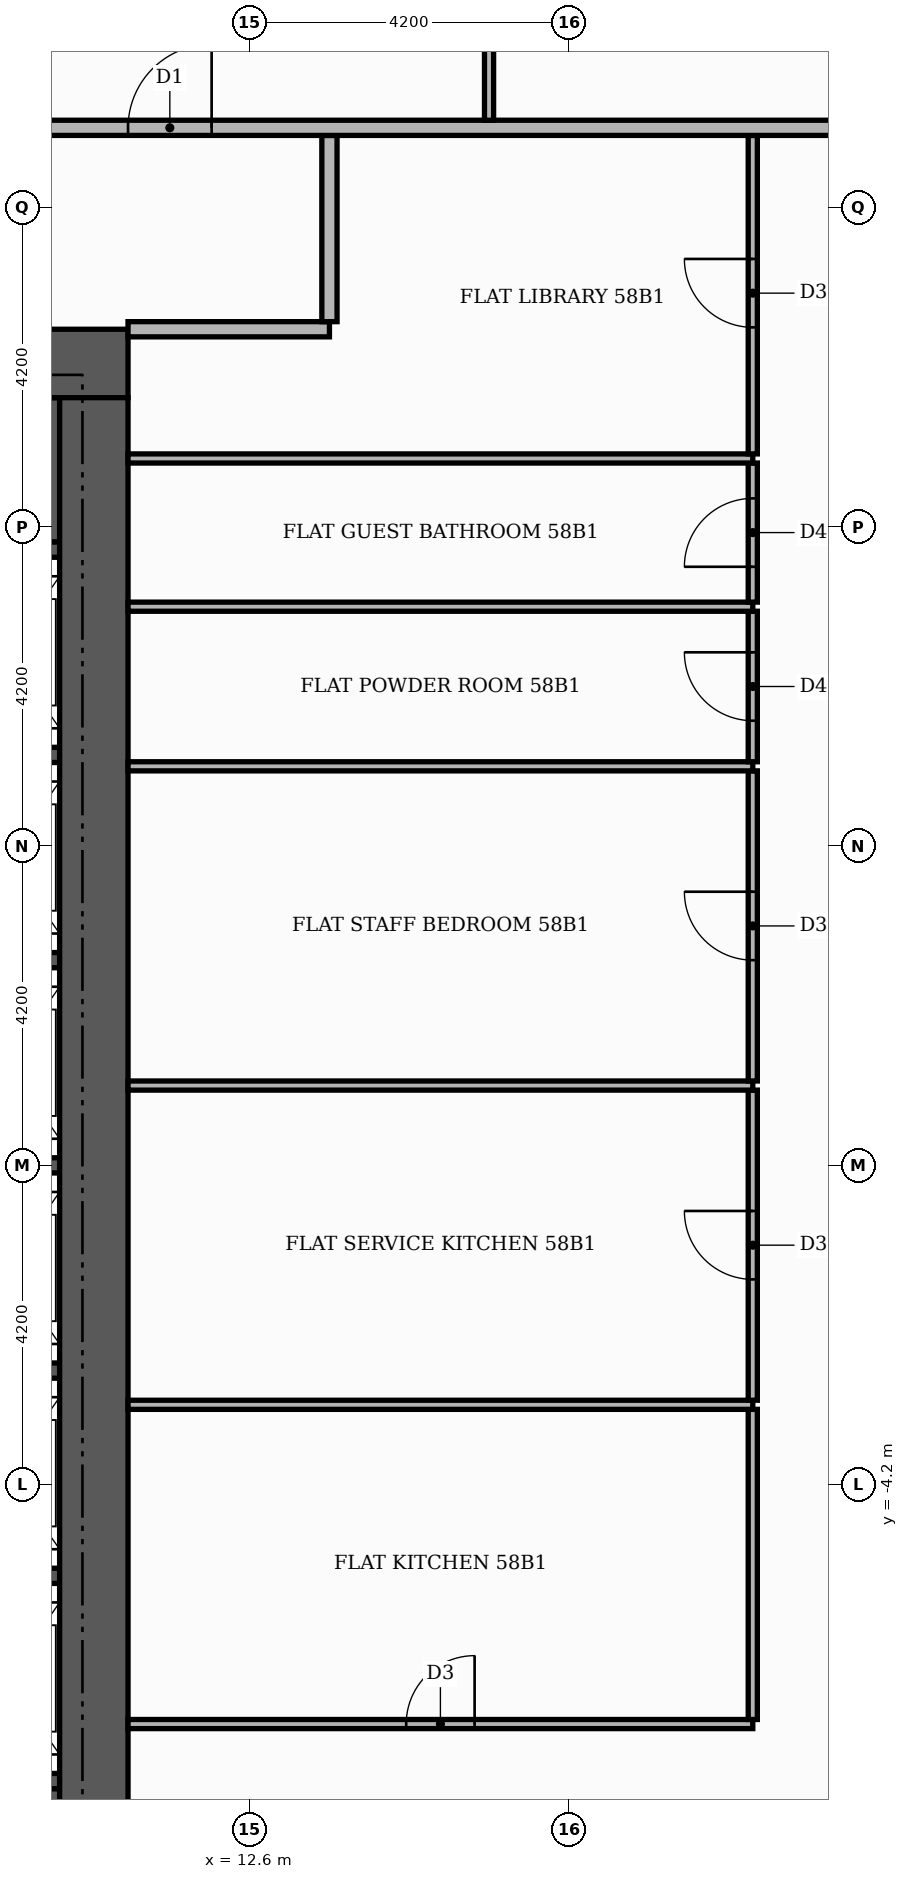
"""IFC4 building model, lengths in metres.
Left out: names, types, materials, properties, quantities, classifications, styles, units other than length and angle.
Written with IfcOpenShell. Run it as: python <this file> out.ifc"""

import sys

from ifc_helpers import new_model, si_unit, direction, frame, frame_2d, origin, place, context, subcontext, project, spatial, rectangle, extrude, element, fill, save


model = new_model("IFC4")
c1 = context("Model", 3, precision=1e-05, world=origin(), true_north=direction((0.0, 1.0)))
c2 = subcontext(c1, "Body", "Model", "MODEL_VIEW")
j1 = project(units=[si_unit("LENGTHUNIT", "METRE"), si_unit("PLANEANGLEUNIT", "RADIAN")], contexts=[c1])
p1 = place(None, origin())
s1 = spatial("IfcSite", under=j1, at=p1, CompositionType="ELEMENT")
p2 = place(p1, origin())
s2 = spatial("IfcBuilding", under=s1, at=p2, CompositionType="ELEMENT")
p3 = place(p2, frame((0.0, 0.0, 244.5)))
s3 = spatial("IfcBuildingStorey", under=s2, at=p3, CompositionType="ELEMENT", Elevation=244.5)
for number, where, z_axis, x_axis in (
    (1, (5.5, -9.15, 0.0), (0.0, 0.0, 1.0), (1.0, 0.0, 0.0)),
    (2, (5.5, 9.15, 0.0), (0.0, 0.0, 1.0), (1.0, 0.0, 0.0)),
):
    element("IfcWall", number, at=place(p3, frame(where, z_axis=z_axis, x_axis=x_axis)), inside=s3, PredefinedType="SHEAR", context=c2, shape_type="SweptSolid", body=[
        extrude(rectangle(XDim=4.6, YDim=1.9, at=frame_2d((2.3, 0.0))), origin(), (0.0, 0.0, 1.0), 3.48),
    ])
for number, where, z_axis, x_axis in (
    (3, (8.1, -8.1, 0.0), (0.0, 0.0, 1.0), (1.0, 0.0, 0.0)),
    (4, (8.1, -5.4, 0.0), (0.0, 0.0, 1.0), (1.0, 0.0, 0.0)),
    (5, (8.1, -2.7, 0.0), (0.0, 0.0, 1.0), (1.0, 0.0, 0.0)),
    (6, (8.1, 0.0, 0.0), (0.0, 0.0, 1.0), (1.0, 0.0, 0.0)),
    (7, (8.1, 2.7, 0.0), (0.0, 0.0, 1.0), (1.0, 0.0, 0.0)),
    (8, (8.1, 5.4, 0.0), (0.0, 0.0, 1.0), (1.0, 0.0, 0.0)),
    (9, (8.1, 8.1, 0.0), (0.0, 0.0, 1.0), (1.0, 0.0, 0.0)),
):
    element("IfcWall", number, at=place(p3, frame(where, z_axis=z_axis, x_axis=x_axis)), inside=s3, PredefinedType="SHEAR", context=c2, shape_type="SweptSolid", body=[
        extrude(rectangle(XDim=2.0, YDim=0.2, at=frame_2d((1.0, 0.0))), origin(), (0.0, 0.0, 1.0), 3.48),
    ])
p4 = place(p3, frame((-11.0, 10.55, 0.0), z_axis=(0.0, 0.0, 1.0), x_axis=(1.0, 0.0, 0.0)))
e10 = element("IfcWall", 10, at=p4, inside=s3, PredefinedType="SHEAR", context=c2, shape_type="SweptSolid", body=[
    extrude(rectangle(XDim=22.0, YDim=0.9, at=frame_2d((11.0, 0.0))), origin(), (0.0, 0.0, 1.0), 3.48),
])
p5 = place(p4, frame((13.3, 0.0, 0.0)))
e11 = element("IfcOpeningElement", 11, at=p5, cuts=e10, PredefinedType="OPENING", context=c2, shape_type="SweptSolid", body=[
    extrude(rectangle(XDim=1.8, YDim=2.2, at=frame_2d((0.9, 1.1))), frame((0.0, 0.46, 0.0), z_axis=(0.0, -1.0, 0.0), x_axis=(1.0, 0.0, 0.0)), (0.0, 0.0, 1.0), 0.92),
])
p6 = place(p3, frame((10.55, -10.1, 0.0), z_axis=(0.0, 0.0, 1.0), x_axis=(0.0, 1.0, 0.0)))
e12 = element("IfcWall", 12, at=p6, inside=s3, PredefinedType="SHEAR", context=c2, shape_type="SweptSolid", body=[
    extrude(rectangle(XDim=20.2, YDim=0.9, at=frame_2d((10.1, 0.0))), origin(), (0.0, 0.0, 1.0), 3.48),
])
p7 = place(p3, frame((11.0, -7.35, 0.0), z_axis=(0.0, 0.0, 1.0), x_axis=(1.0, 0.0, 0.0)))
e13 = element("IfcWall", 13, at=p7, inside=s3, PredefinedType="PARTITIONING", context=c2, shape_type="SweptSolid", body=[
    extrude(rectangle(XDim=8.22, YDim=0.12, at=frame_2d((4.11, 0.0))), origin(), (0.0, 0.0, 1.0), 3.48),
])
p8 = place(p7, frame((3.66, 0.0, 0.0)))
e14 = element("IfcOpeningElement", 14, at=p8, cuts=e13, PredefinedType="OPENING", context=c2, shape_type="SweptSolid", body=[
    extrude(rectangle(XDim=0.9, YDim=2.1, at=frame_2d((0.45, 1.05))), frame((0.0, 0.07, 0.0), z_axis=(0.0, -1.0, 0.0), x_axis=(1.0, 0.0, 0.0)), (0.0, 0.0, 1.0), 0.14),
])
p9 = place(p3, frame((19.22, -7.29, 0.0), z_axis=(0.0, 0.0, 1.0), x_axis=(0.0, 1.0, 0.0)))
e15 = element("IfcWall", 15, at=p9, inside=s3, PredefinedType="PARTITIONING", context=c2, shape_type="SweptSolid", body=[
    extrude(rectangle(XDim=4.08, YDim=0.12, at=frame_2d((2.04, 0.0))), origin(), (0.0, 0.0, 1.0), 3.48),
])
p10 = place(p3, frame((11.0, -3.15, 0.0), z_axis=(0.0, 0.0, 1.0), x_axis=(1.0, 0.0, 0.0)))
e16 = element("IfcWall", 16, at=p10, inside=s3, PredefinedType="PARTITIONING", context=c2, shape_type="SweptSolid", body=[
    extrude(rectangle(XDim=8.22, YDim=0.12, at=frame_2d((4.11, 0.0))), origin(), (0.0, 0.0, 1.0), 3.48),
])
p11 = place(p3, frame((19.22, -3.09, 0.0), z_axis=(0.0, 0.0, 1.0), x_axis=(0.0, 1.0, 0.0)))
e17 = element("IfcWall", 17, at=p11, inside=s3, PredefinedType="PARTITIONING", context=c2, shape_type="SweptSolid", body=[
    extrude(rectangle(XDim=4.08, YDim=0.12, at=frame_2d((2.04, 0.0))), origin(), (0.0, 0.0, 1.0), 3.48),
])
p12 = place(p11, frame((1.59, 0.0, 0.0)))
e18 = element("IfcOpeningElement", 18, at=p12, cuts=e17, PredefinedType="OPENING", context=c2, shape_type="SweptSolid", body=[
    extrude(rectangle(XDim=0.9, YDim=2.1, at=frame_2d((0.45, 1.05))), frame((0.0, 0.07, 0.0), z_axis=(0.0, -1.0, 0.0), x_axis=(1.0, 0.0, 0.0)), (0.0, 0.0, 1.0), 0.14),
])
p13 = place(p3, frame((11.0, 1.05, 0.0), z_axis=(0.0, 0.0, 1.0), x_axis=(1.0, 0.0, 0.0)))
e19 = element("IfcWall", 19, at=p13, inside=s3, PredefinedType="PARTITIONING", context=c2, shape_type="SweptSolid", body=[
    extrude(rectangle(XDim=8.22, YDim=0.12, at=frame_2d((4.11, 0.0))), origin(), (0.0, 0.0, 1.0), 3.48),
])
p14 = place(p3, frame((19.22, 1.11, 0.0), z_axis=(0.0, 0.0, 1.0), x_axis=(0.0, 1.0, 0.0)))
e20 = element("IfcWall", 20, at=p14, inside=s3, PredefinedType="PARTITIONING", context=c2, shape_type="SweptSolid", body=[
    extrude(rectangle(XDim=4.08, YDim=0.12, at=frame_2d((2.04, 0.0))), origin(), (0.0, 0.0, 1.0), 3.48),
])
p15 = place(p14, frame((1.59, 0.0, 0.0)))
e21 = element("IfcOpeningElement", 21, at=p15, cuts=e20, PredefinedType="OPENING", context=c2, shape_type="SweptSolid", body=[
    extrude(rectangle(XDim=0.9, YDim=2.1, at=frame_2d((0.45, 1.05))), frame((0.0, 0.07, 0.0), z_axis=(0.0, -1.0, 0.0), x_axis=(1.0, 0.0, 0.0)), (0.0, 0.0, 1.0), 0.14),
])
p16 = place(p3, frame((11.0, 5.25, 0.0), z_axis=(0.0, 0.0, 1.0), x_axis=(1.0, 0.0, 0.0)))
e22 = element("IfcWall", 22, at=p16, inside=s3, PredefinedType="PARTITIONING", context=c2, shape_type="SweptSolid", body=[
    extrude(rectangle(XDim=8.22, YDim=0.12, at=frame_2d((4.11, 0.0))), origin(), (0.0, 0.0, 1.0), 3.48),
])
p17 = place(p3, frame((19.22, 5.31, 0.0), z_axis=(0.0, 0.0, 1.0), x_axis=(0.0, 1.0, 0.0)))
e23 = element("IfcWall", 23, at=p17, inside=s3, PredefinedType="PARTITIONING", context=c2, shape_type="SweptSolid", body=[
    extrude(rectangle(XDim=1.98, YDim=0.12, at=frame_2d((0.99, 0.0))), origin(), (0.0, 0.0, 1.0), 3.48),
])
p18 = place(p17, frame((0.54, 0.0, 0.0)))
e24 = element("IfcOpeningElement", 24, at=p18, cuts=e23, PredefinedType="OPENING", context=c2, shape_type="SweptSolid", body=[
    extrude(rectangle(XDim=0.9, YDim=2.1, at=frame_2d((0.45, 1.05))), frame((0.0, 0.07, 0.0), z_axis=(0.0, -1.0, 0.0), x_axis=(1.0, 0.0, 0.0)), (0.0, 0.0, 1.0), 0.14),
])
p19 = place(p3, frame((11.0, 7.35, 0.0), z_axis=(0.0, 0.0, 1.0), x_axis=(1.0, 0.0, 0.0)))
e25 = element("IfcWall", 25, at=p19, inside=s3, PredefinedType="PARTITIONING", context=c2, shape_type="SweptSolid", body=[
    extrude(rectangle(XDim=8.22, YDim=0.12, at=frame_2d((4.11, 0.0))), origin(), (0.0, 0.0, 1.0), 3.48),
])
p20 = place(p3, frame((19.22, 7.41, 0.0), z_axis=(0.0, 0.0, 1.0), x_axis=(0.0, 1.0, 0.0)))
e26 = element("IfcWall", 26, at=p20, inside=s3, PredefinedType="PARTITIONING", context=c2, shape_type="SweptSolid", body=[
    extrude(rectangle(XDim=1.83, YDim=0.12, at=frame_2d((0.915, 0.0))), origin(), (0.0, 0.0, 1.0), 3.48),
])
p21 = place(p20, frame((0.465, 0.0, 0.0)))
e27 = element("IfcOpeningElement", 27, at=p21, cuts=e26, PredefinedType="OPENING", context=c2, shape_type="SweptSolid", body=[
    extrude(rectangle(XDim=0.9, YDim=2.1, at=frame_2d((0.45, 1.05))), frame((0.0, 0.07, 0.0), z_axis=(0.0, -1.0, 0.0), x_axis=(1.0, 0.0, 0.0)), (0.0, 0.0, 1.0), 0.14),
])
p22 = place(p3, frame((11.0, 9.3, 0.0), z_axis=(0.0, 0.0, 1.0), x_axis=(1.0, 0.0, 0.0)))
e28 = element("IfcWall", 28, at=p22, inside=s3, PredefinedType="PARTITIONING", context=c2, shape_type="SweptSolid", body=[
    extrude(rectangle(XDim=8.22, YDim=0.12, at=frame_2d((4.11, 0.0))), origin(), (0.0, 0.0, 1.0), 3.48),
])
p23 = place(p3, frame((19.22, 9.36, 0.0), z_axis=(0.0, 0.0, 1.0), x_axis=(0.0, 1.0, 0.0)))
e29 = element("IfcWall", 29, at=p23, inside=s3, PredefinedType="PARTITIONING", context=c2, shape_type="SweptSolid", body=[
    extrude(rectangle(XDim=4.19, YDim=0.12, at=frame_2d((2.095, 0.0))), origin(), (0.0, 0.0, 1.0), 3.48),
])
p24 = place(p23, frame((1.665, 0.0, 0.0)))
e30 = element("IfcOpeningElement", 30, at=p24, cuts=e29, PredefinedType="OPENING", context=c2, shape_type="SweptSolid", body=[
    extrude(rectangle(XDim=0.9, YDim=2.1, at=frame_2d((0.45, 1.05))), frame((0.0, 0.07, 0.0), z_axis=(0.0, -1.0, 0.0), x_axis=(1.0, 0.0, 0.0)), (0.0, 0.0, 1.0), 0.14),
])
p25 = place(p3, frame((11.0, 11.0, 0.0), z_axis=(0.0, 0.0, 1.0), x_axis=(1.0, 0.0, 0.0)))
e31 = element("IfcWall", 31, at=p25, inside=s3, PredefinedType="PARTITIONING", context=c2, shape_type="SweptSolid", body=[
    extrude(rectangle(XDim=2.65, YDim=0.2, at=frame_2d((1.325, 0.0))), origin(), (0.0, 0.0, 1.0), 3.48),
])
p26 = place(p3, frame((13.65, 11.1, 0.0), z_axis=(0.0, 0.0, 1.0), x_axis=(0.0, 1.0, 0.0)))
e32 = element("IfcWall", 32, at=p26, inside=s3, PredefinedType="PARTITIONING", context=c2, shape_type="SweptSolid", body=[
    extrude(rectangle(XDim=2.45, YDim=0.2, at=frame_2d((1.225, 0.0))), origin(), (0.0, 0.0, 1.0), 3.48),
])
p27 = place(p3, frame((-13.65, 13.65, 0.0), z_axis=(0.0, 0.0, 1.0), x_axis=(1.0, 0.0, 0.0)))
e33 = element("IfcWall", 33, at=p27, inside=s3, PredefinedType="PARTITIONING", context=c2, shape_type="SweptSolid", body=[
    extrude(rectangle(XDim=39.07, YDim=0.2, at=frame_2d((19.535, 0.0))), origin(), (0.0, 0.0, 1.0), 3.48),
])
p28 = place(p27, frame((24.65, 0.0, 0.0)))
e34 = element("IfcOpeningElement", 34, at=p28, cuts=e33, PredefinedType="OPENING", context=c2, shape_type="SweptSolid", body=[
    extrude(rectangle(XDim=1.1, YDim=2.4, at=frame_2d((0.55, 1.2))), frame((0.0, 0.11, 0.0), z_axis=(0.0, -1.0, 0.0), x_axis=(1.0, 0.0, 0.0)), (0.0, 0.0, 1.0), 0.22),
])
p29 = place(p27, frame((12.05, 0.0, 0.0)))
e35 = element("IfcOpeningElement", 35, at=p29, cuts=e33, PredefinedType="OPENING", context=c2, shape_type="SweptSolid", body=[
    extrude(rectangle(XDim=1.1, YDim=2.4, at=frame_2d((0.55, 1.2))), frame((0.0, 0.11, 0.0), z_axis=(0.0, -1.0, 0.0), x_axis=(1.0, 0.0, 0.0)), (0.0, 0.0, 1.0), 0.22),
])
p30 = place(p3, frame((15.75, 13.75, 0.0), z_axis=(0.0, 0.0, 1.0), x_axis=(0.0, 1.0, 0.0)))
e36 = element("IfcWall", 36, at=p30, inside=s3, PredefinedType="PARTITIONING", context=c2, shape_type="SweptSolid", body=[
    extrude(rectangle(XDim=6.01, YDim=0.12, at=frame_2d((3.005, 0.0))), origin(), (0.0, 0.0, 1.0), 3.48),
])
p31 = place(p30, frame((2.485, 0.0, 0.0)))
e37 = element("IfcOpeningElement", 37, at=p31, cuts=e36, PredefinedType="OPENING", context=c2, shape_type="SweptSolid", body=[
    extrude(rectangle(XDim=1.0, YDim=2.1, at=frame_2d((0.5, 1.05))), frame((0.0, 0.07, 0.0), z_axis=(0.0, -1.0, 0.0), x_axis=(1.0, 0.0, 0.0)), (0.0, 0.0, 1.0), 0.14),
])
p32 = place(p8, origin())
e38 = element("IfcDoor", 38, at=p32, inside=s3, OperationType="SINGLE_SWING_RIGHT", PredefinedType="DOOR", context=c2, shape_type="SweptSolid", body=[
    extrude(rectangle(XDim=0.9, YDim=2.1, at=frame_2d((0.45, 1.05))), frame((0.0, 0.025, 0.0), z_axis=(0.0, -1.0, 0.0), x_axis=(1.0, 0.0, 0.0)), (0.0, 0.0, 1.0), 0.05),
])
fill(e14, e38)
p33 = place(p12, origin())
e39 = element("IfcDoor", 39, at=p33, inside=s3, OperationType="SINGLE_SWING_RIGHT", PredefinedType="DOOR", context=c2, shape_type="SweptSolid", body=[
    extrude(rectangle(XDim=0.9, YDim=2.1, at=frame_2d((0.45, 1.05))), frame((0.0, 0.025, 0.0), z_axis=(0.0, -1.0, 0.0), x_axis=(1.0, 0.0, 0.0)), (0.0, 0.0, 1.0), 0.05),
])
fill(e18, e39)
p34 = place(p15, origin())
e40 = element("IfcDoor", 40, at=p34, inside=s3, OperationType="SINGLE_SWING_RIGHT", PredefinedType="DOOR", context=c2, shape_type="SweptSolid", body=[
    extrude(rectangle(XDim=0.9, YDim=2.1, at=frame_2d((0.45, 1.05))), frame((0.0, 0.025, 0.0), z_axis=(0.0, -1.0, 0.0), x_axis=(1.0, 0.0, 0.0)), (0.0, 0.0, 1.0), 0.05),
])
fill(e21, e40)
p35 = place(p18, origin())
e41 = element("IfcDoor", 41, at=p35, inside=s3, OperationType="SINGLE_SWING_RIGHT", PredefinedType="DOOR", context=c2, shape_type="SweptSolid", body=[
    extrude(rectangle(XDim=0.9, YDim=2.1, at=frame_2d((0.45, 1.05))), frame((0.0, 0.025, 0.0), z_axis=(0.0, -1.0, 0.0), x_axis=(1.0, 0.0, 0.0)), (0.0, 0.0, 1.0), 0.05),
])
fill(e24, e41)
p36 = place(p21, origin())
e42 = element("IfcDoor", 42, at=p36, inside=s3, OperationType="SINGLE_SWING_LEFT", PredefinedType="DOOR", context=c2, shape_type="SweptSolid", body=[
    extrude(rectangle(XDim=0.9, YDim=2.1, at=frame_2d((0.45, 1.05))), frame((0.0, 0.025, 0.0), z_axis=(0.0, -1.0, 0.0), x_axis=(1.0, 0.0, 0.0)), (0.0, 0.0, 1.0), 0.05),
])
fill(e27, e42)
p37 = place(p24, origin())
e43 = element("IfcDoor", 43, at=p37, inside=s3, OperationType="SINGLE_SWING_RIGHT", PredefinedType="DOOR", context=c2, shape_type="SweptSolid", body=[
    extrude(rectangle(XDim=0.9, YDim=2.1, at=frame_2d((0.45, 1.05))), frame((0.0, 0.025, 0.0), z_axis=(0.0, -1.0, 0.0), x_axis=(1.0, 0.0, 0.0)), (0.0, 0.0, 1.0), 0.05),
])
fill(e30, e43)
p38 = place(p28, origin())
e44 = element("IfcDoor", 44, at=p38, inside=s3, OperationType="SINGLE_SWING_RIGHT", PredefinedType="DOOR", context=c2, shape_type="SweptSolid", body=[
    extrude(rectangle(XDim=1.1, YDim=2.4, at=frame_2d((0.55, 1.2))), frame((0.0, 0.025, 0.0), z_axis=(0.0, -1.0, 0.0), x_axis=(1.0, 0.0, 0.0)), (0.0, 0.0, 1.0), 0.05),
])
fill(e34, e44)
save(model, sys.argv[1])
